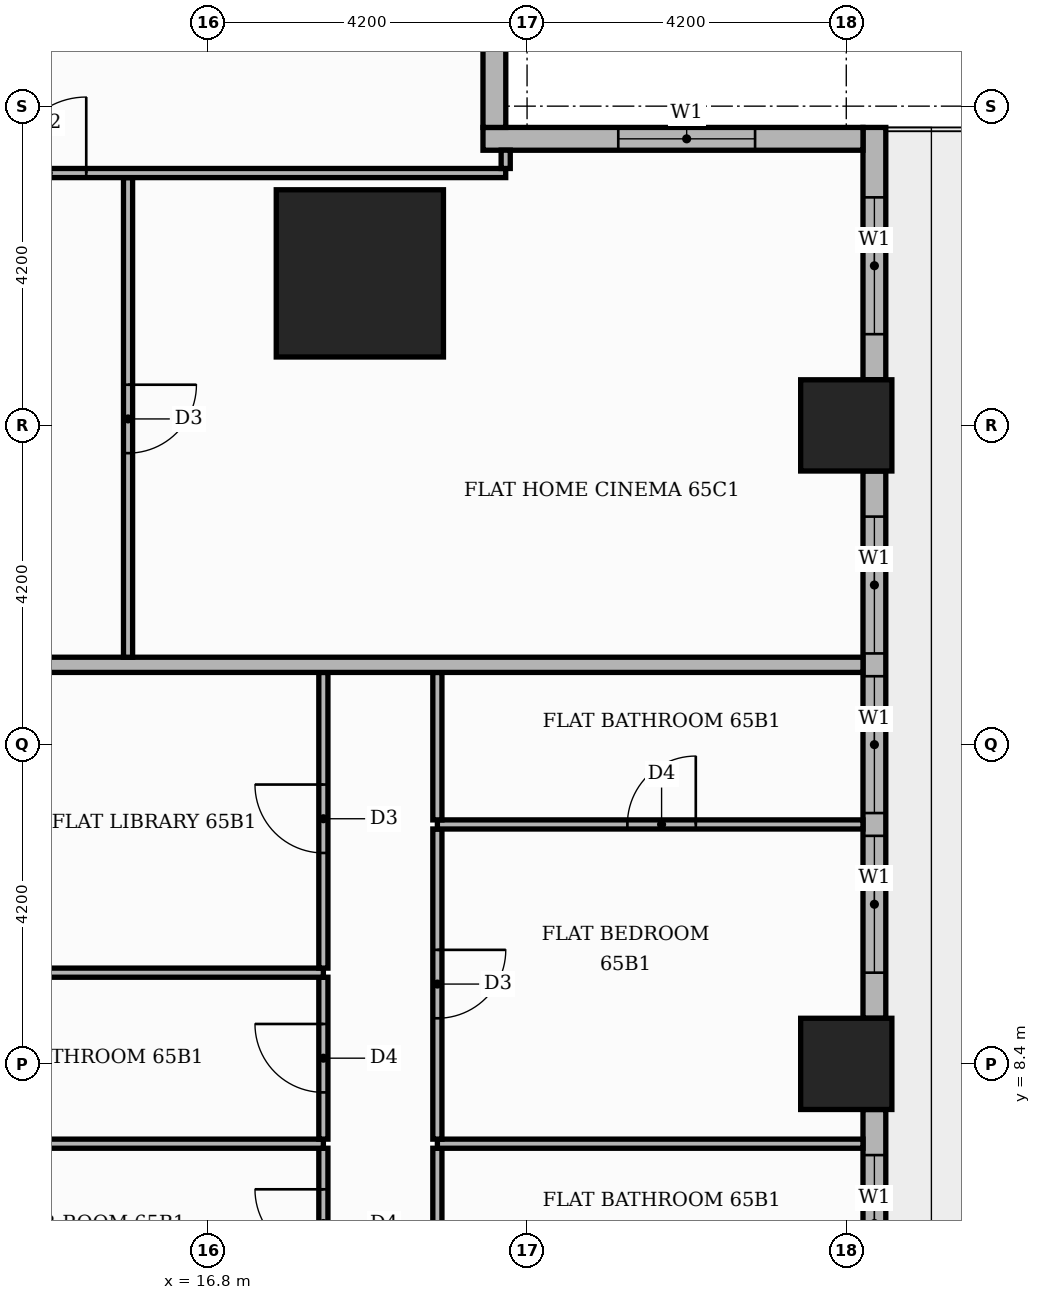
"""IFC4 building model, lengths in metres.
Left out: names, types, materials, properties, quantities, classifications, styles, units other than length and angle.
Written with IfcOpenShell. Run it as: python <this file> out.ifc"""

import sys

from ifc_helpers import new_model, si_unit, direction, frame, frame_2d, origin, origin_2d, place, context, subcontext, project, spatial, rectangle, extrude, element, fill, save


model = new_model("IFC4")
c1 = context("Model", 3, precision=1e-05, world=origin(), true_north=direction((0.0, 1.0)))
c2 = subcontext(c1, "Body", "Model", "MODEL_VIEW")
j1 = project(units=[si_unit("LENGTHUNIT", "METRE"), si_unit("PLANEANGLEUNIT", "RADIAN")], contexts=[c1])
p1 = place(None, origin())
s1 = spatial("IfcSite", under=j1, at=p1, CompositionType="ELEMENT")
p2 = place(p1, origin())
s2 = spatial("IfcBuilding", under=s1, at=p2, CompositionType="ELEMENT")
p3 = place(p2, frame((0.0, 0.0, 271.8)))
s3 = spatial("IfcBuildingStorey", under=s2, at=p3, CompositionType="ELEMENT", Elevation=271.8)
p4 = place(p3, frame((18.8, 18.8, 0.0), z_axis=(0.0, 0.0, 1.0), x_axis=(1.0, 0.0, 0.0)))
e1 = element("IfcColumn", 1, at=p4, inside=s3, PredefinedType="COLUMN", context=c2, shape_type="SweptSolid", body=[
    extrude(rectangle(XDim=2.2, YDim=2.2, at=origin_2d()), origin(), (0.0, 0.0, 1.0), 3.9),
])
for number, where, z_axis, x_axis in (
    (2, (25.2, 8.4, 0.0), (0.0, 0.0, 1.0), (1.0, 0.0, 0.0)),
    (3, (25.2, 16.8, 0.0), (0.0, 0.0, 1.0), (1.0, 0.0, 0.0)),
):
    element("IfcColumn", number, at=place(p3, frame(where, z_axis=z_axis, x_axis=x_axis)), inside=s3, PredefinedType="COLUMN", context=c2, shape_type="SweptSolid", body=[
        extrude(rectangle(XDim=1.2, YDim=1.2, at=origin_2d()), origin(), (0.0, 0.0, 1.0), 3.9),
    ])
p5 = place(p3, frame((25.57, 0.6, 0.0), z_axis=(0.0, 0.0, 1.0), x_axis=(0.0, 1.0, 0.0)))
e4 = element("IfcWall", 4, at=p5, inside=s3, PredefinedType="STANDARD", context=c2, shape_type="SweptSolid", body=[
    extrude(rectangle(XDim=7.2, YDim=0.3, at=frame_2d((3.6, 0.0))), origin(), (0.0, 0.0, 1.0), 3.48),
])
p6 = place(p5, frame((0.6, 0.0, 0.0)))
e5 = element("IfcOpeningElement", 5, at=p6, cuts=e4, PredefinedType="OPENING", context=c2, shape_type="SweptSolid", body=[
    extrude(rectangle(XDim=1.8, YDim=2.4, at=frame_2d((0.9, 1.2))), frame((0.0, 0.16, 0.0), z_axis=(0.0, -1.0, 0.0), x_axis=(1.0, 0.0, 0.0)), (0.0, 0.0, 1.0), 0.32),
])
p7 = place(p5, frame((2.7, 0.0, 0.9)))
e6 = element("IfcOpeningElement", 6, at=p7, cuts=e4, PredefinedType="OPENING", context=c2, shape_type="SweptSolid", body=[
    extrude(rectangle(XDim=1.8, YDim=2.1, at=frame_2d((0.9, 1.05))), frame((0.0, 0.16, 0.0), z_axis=(0.0, -1.0, 0.0), x_axis=(1.0, 0.0, 0.0)), (0.0, 0.0, 1.0), 0.32),
])
p8 = place(p5, frame((4.8, 0.0, 0.9)))
e7 = element("IfcOpeningElement", 7, at=p8, cuts=e4, PredefinedType="OPENING", context=c2, shape_type="SweptSolid", body=[
    extrude(rectangle(XDim=1.8, YDim=2.1, at=frame_2d((0.9, 1.05))), frame((0.0, 0.16, 0.0), z_axis=(0.0, -1.0, 0.0), x_axis=(1.0, 0.0, 0.0)), (0.0, 0.0, 1.0), 0.32),
])
p9 = place(p3, frame((25.57, 9.0, 0.0), z_axis=(0.0, 0.0, 1.0), x_axis=(0.0, 1.0, 0.0)))
e8 = element("IfcWall", 8, at=p9, inside=s3, PredefinedType="STANDARD", context=c2, shape_type="SweptSolid", body=[
    extrude(rectangle(XDim=7.2, YDim=0.3, at=frame_2d((3.6, 0.0))), origin(), (0.0, 0.0, 1.0), 3.48),
])
p10 = place(p9, frame((0.6, 0.0, 0.9)))
e9 = element("IfcOpeningElement", 9, at=p10, cuts=e8, PredefinedType="OPENING", context=c2, shape_type="SweptSolid", body=[
    extrude(rectangle(XDim=1.8, YDim=2.1, at=frame_2d((0.9, 1.05))), frame((0.0, 0.16, 0.0), z_axis=(0.0, -1.0, 0.0), x_axis=(1.0, 0.0, 0.0)), (0.0, 0.0, 1.0), 0.32),
])
p11 = place(p9, frame((2.7, 0.0, 0.9)))
e10 = element("IfcOpeningElement", 10, at=p11, cuts=e8, PredefinedType="OPENING", context=c2, shape_type="SweptSolid", body=[
    extrude(rectangle(XDim=1.8, YDim=2.1, at=frame_2d((0.9, 1.05))), frame((0.0, 0.16, 0.0), z_axis=(0.0, -1.0, 0.0), x_axis=(1.0, 0.0, 0.0)), (0.0, 0.0, 1.0), 0.32),
])
p12 = place(p9, frame((4.8, 0.0, 0.9)))
e11 = element("IfcOpeningElement", 11, at=p12, cuts=e8, PredefinedType="OPENING", context=c2, shape_type="SweptSolid", body=[
    extrude(rectangle(XDim=1.8, YDim=2.1, at=frame_2d((0.9, 1.05))), frame((0.0, 0.16, 0.0), z_axis=(0.0, -1.0, 0.0), x_axis=(1.0, 0.0, 0.0)), (0.0, 0.0, 1.0), 0.32),
])
p13 = place(p3, frame((25.57, 17.4, 0.0), z_axis=(0.0, 0.0, 1.0), x_axis=(0.0, 1.0, 0.0)))
e12 = element("IfcWall", 12, at=p13, inside=s3, PredefinedType="STANDARD", context=c2, shape_type="SweptSolid", body=[
    extrude(rectangle(XDim=3.32, YDim=0.3, at=frame_2d((1.66, 0.0))), origin(), (0.0, 0.0, 1.0), 3.48),
])
p14 = place(p13, frame((0.6, 0.0, 0.9)))
e13 = element("IfcOpeningElement", 13, at=p14, cuts=e12, PredefinedType="OPENING", context=c2, shape_type="SweptSolid", body=[
    extrude(rectangle(XDim=1.8, YDim=2.1, at=frame_2d((0.9, 1.05))), frame((0.0, 0.16, 0.0), z_axis=(0.0, -1.0, 0.0), x_axis=(1.0, 0.0, 0.0)), (0.0, 0.0, 1.0), 0.32),
])
p15 = place(p3, frame((25.42, 20.57, 0.0), z_axis=(0.0, 0.0, 1.0), x_axis=(-1.0, 0.0, 0.0)))
e14 = element("IfcWall", 14, at=p15, inside=s3, PredefinedType="STANDARD", context=c2, shape_type="SweptSolid", body=[
    extrude(rectangle(XDim=5.0, YDim=0.3, at=frame_2d((2.5, 0.0))), origin(), (0.0, 0.0, 1.0), 3.48),
])
p16 = place(p15, frame((1.42, 0.0, 0.9)))
e15 = element("IfcOpeningElement", 15, at=p16, cuts=e14, PredefinedType="OPENING", context=c2, shape_type="SweptSolid", body=[
    extrude(rectangle(XDim=1.8, YDim=2.1, at=frame_2d((0.9, 1.05))), frame((0.0, 0.16, 0.0), z_axis=(0.0, -1.0, 0.0), x_axis=(1.0, 0.0, 0.0)), (0.0, 0.0, 1.0), 0.32),
])
p17 = place(p3, frame((20.57, 20.72, 0.0), z_axis=(0.0, 0.0, 1.0), x_axis=(0.0, 1.0, 0.0)))
e16 = element("IfcWall", 16, at=p17, inside=s3, PredefinedType="STANDARD", context=c2, shape_type="SweptSolid", body=[
    extrude(rectangle(XDim=5.0, YDim=0.3, at=frame_2d((2.5, 0.0))), origin(), (0.0, 0.0, 1.0), 3.48),
])
p18 = place(p17, frame((1.48, 0.0, 0.9)))
e17 = element("IfcOpeningElement", 17, at=p18, cuts=e16, PredefinedType="OPENING", context=c2, shape_type="SweptSolid", body=[
    extrude(rectangle(XDim=1.8, YDim=2.1, at=frame_2d((0.9, 1.05))), frame((0.0, 0.16, 0.0), z_axis=(0.0, -1.0, 0.0), x_axis=(1.0, 0.0, 0.0)), (0.0, 0.0, 1.0), 0.32),
])
p19 = place(p3, frame((18.32, 5.31, 0.0), z_axis=(0.0, 0.0, 1.0), x_axis=(0.0, 1.0, 0.0)))
e18 = element("IfcWall", 18, at=p19, inside=s3, PredefinedType="PARTITIONING", context=c2, shape_type="SweptSolid", body=[
    extrude(rectangle(XDim=1.98, YDim=0.12, at=frame_2d((0.99, 0.0))), origin(), (0.0, 0.0, 1.0), 3.48),
])
p20 = place(p19, frame((0.54, 0.0, 0.0)))
e19 = element("IfcOpeningElement", 19, at=p20, cuts=e18, PredefinedType="OPENING", context=c2, shape_type="SweptSolid", body=[
    extrude(rectangle(XDim=0.9, YDim=2.1, at=frame_2d((0.45, 1.05))), frame((0.0, 0.07, 0.0), z_axis=(0.0, -1.0, 0.0), x_axis=(1.0, 0.0, 0.0)), (0.0, 0.0, 1.0), 0.14),
])
p21 = place(p3, frame((19.82, 5.31, 0.0), z_axis=(0.0, 0.0, 1.0), x_axis=(0.0, 1.0, 0.0)))
e20 = element("IfcWall", 20, at=p21, inside=s3, PredefinedType="PARTITIONING", context=c2, shape_type="SweptSolid", body=[
    extrude(rectangle(XDim=1.98, YDim=0.12, at=frame_2d((0.99, 0.0))), origin(), (0.0, 0.0, 1.0), 3.48),
])
p22 = place(p3, frame((11.0, 7.35, 0.0), z_axis=(0.0, 0.0, 1.0), x_axis=(1.0, 0.0, 0.0)))
e21 = element("IfcWall", 21, at=p22, inside=s3, PredefinedType="PARTITIONING", context=c2, shape_type="SweptSolid", body=[
    extrude(rectangle(XDim=7.32, YDim=0.12, at=frame_2d((3.66, 0.0))), origin(), (0.0, 0.0, 1.0), 3.48),
])
p23 = place(p3, frame((19.82, 7.35, 0.0), z_axis=(0.0, 0.0, 1.0), x_axis=(1.0, 0.0, 0.0)))
e22 = element("IfcWall", 22, at=p23, inside=s3, PredefinedType="PARTITIONING", context=c2, shape_type="SweptSolid", body=[
    extrude(rectangle(XDim=5.6, YDim=0.12, at=frame_2d((2.8, 0.0))), origin(), (0.0, 0.0, 1.0), 3.48),
])
p24 = place(p3, frame((18.32, 7.41, 0.0), z_axis=(0.0, 0.0, 1.0), x_axis=(0.0, 1.0, 0.0)))
e23 = element("IfcWall", 23, at=p24, inside=s3, PredefinedType="PARTITIONING", context=c2, shape_type="SweptSolid", body=[
    extrude(rectangle(XDim=2.13, YDim=0.12, at=frame_2d((1.065, 0.0))), origin(), (0.0, 0.0, 1.0), 3.48),
])
p25 = place(p24, frame((0.615, 0.0, 0.0)))
e24 = element("IfcOpeningElement", 24, at=p25, cuts=e23, PredefinedType="OPENING", context=c2, shape_type="SweptSolid", body=[
    extrude(rectangle(XDim=0.9, YDim=2.1, at=frame_2d((0.45, 1.05))), frame((0.0, 0.07, 0.0), z_axis=(0.0, -1.0, 0.0), x_axis=(1.0, 0.0, 0.0)), (0.0, 0.0, 1.0), 0.14),
])
p26 = place(p3, frame((19.82, 7.41, 0.0), z_axis=(0.0, 0.0, 1.0), x_axis=(0.0, 1.0, 0.0)))
e25 = element("IfcWall", 25, at=p26, inside=s3, PredefinedType="PARTITIONING", context=c2, shape_type="SweptSolid", body=[
    extrude(rectangle(XDim=4.08, YDim=0.12, at=frame_2d((2.04, 0.0))), origin(), (0.0, 0.0, 1.0), 3.48),
])
p27 = place(p26, frame((1.59, 0.0, 0.0)))
e26 = element("IfcOpeningElement", 26, at=p27, cuts=e25, PredefinedType="OPENING", context=c2, shape_type="SweptSolid", body=[
    extrude(rectangle(XDim=0.9, YDim=2.1, at=frame_2d((0.45, 1.05))), frame((0.0, 0.07, 0.0), z_axis=(0.0, -1.0, 0.0), x_axis=(1.0, 0.0, 0.0)), (0.0, 0.0, 1.0), 0.14),
])
p28 = place(p3, frame((11.0, 9.6, 0.0), z_axis=(0.0, 0.0, 1.0), x_axis=(1.0, 0.0, 0.0)))
e27 = element("IfcWall", 27, at=p28, inside=s3, PredefinedType="PARTITIONING", context=c2, shape_type="SweptSolid", body=[
    extrude(rectangle(XDim=7.32, YDim=0.12, at=frame_2d((3.66, 0.0))), origin(), (0.0, 0.0, 1.0), 3.48),
])
p29 = place(p3, frame((18.32, 9.66, 0.0), z_axis=(0.0, 0.0, 1.0), x_axis=(0.0, 1.0, 0.0)))
e28 = element("IfcWall", 28, at=p29, inside=s3, PredefinedType="PARTITIONING", context=c2, shape_type="SweptSolid", body=[
    extrude(rectangle(XDim=3.89, YDim=0.12, at=frame_2d((1.945, 0.0))), origin(), (0.0, 0.0, 1.0), 3.48),
])
p30 = place(p29, frame((1.515, 0.0, 0.0)))
e29 = element("IfcOpeningElement", 29, at=p30, cuts=e28, PredefinedType="OPENING", context=c2, shape_type="SweptSolid", body=[
    extrude(rectangle(XDim=0.9, YDim=2.1, at=frame_2d((0.45, 1.05))), frame((0.0, 0.07, 0.0), z_axis=(0.0, -1.0, 0.0), x_axis=(1.0, 0.0, 0.0)), (0.0, 0.0, 1.0), 0.14),
])
p31 = place(p3, frame((19.82, 11.55, 0.0), z_axis=(0.0, 0.0, 1.0), x_axis=(1.0, 0.0, 0.0)))
e30 = element("IfcWall", 30, at=p31, inside=s3, PredefinedType="PARTITIONING", context=c2, shape_type="SweptSolid", body=[
    extrude(rectangle(XDim=5.6, YDim=0.12, at=frame_2d((2.8, 0.0))), origin(), (0.0, 0.0, 1.0), 3.48),
])
p32 = place(p31, frame((2.5, 0.0, 0.0)))
e31 = element("IfcOpeningElement", 31, at=p32, cuts=e30, PredefinedType="OPENING", context=c2, shape_type="SweptSolid", body=[
    extrude(rectangle(XDim=0.9, YDim=2.1, at=frame_2d((0.45, 1.05))), frame((0.0, 0.07, 0.0), z_axis=(0.0, -1.0, 0.0), x_axis=(1.0, 0.0, 0.0)), (0.0, 0.0, 1.0), 0.14),
])
p33 = place(p3, frame((19.82, 11.61, 0.0), z_axis=(0.0, 0.0, 1.0), x_axis=(0.0, 1.0, 0.0)))
e32 = element("IfcWall", 32, at=p33, inside=s3, PredefinedType="PARTITIONING", context=c2, shape_type="SweptSolid", body=[
    extrude(rectangle(XDim=1.94, YDim=0.12, at=frame_2d((0.97, 0.0))), origin(), (0.0, 0.0, 1.0), 3.48),
])
p34 = place(p3, frame((-13.65, 13.65, 0.0), z_axis=(0.0, 0.0, 1.0), x_axis=(1.0, 0.0, 0.0)))
e33 = element("IfcWall", 33, at=p34, inside=s3, PredefinedType="PARTITIONING", context=c2, shape_type="SweptSolid", body=[
    extrude(rectangle(XDim=39.07, YDim=0.2, at=frame_2d((19.535, 0.0))), origin(), (0.0, 0.0, 1.0), 3.48),
])
p35 = place(p34, frame((24.65, 0.0, 0.0)))
e34 = element("IfcOpeningElement", 34, at=p35, cuts=e33, PredefinedType="OPENING", context=c2, shape_type="SweptSolid", body=[
    extrude(rectangle(XDim=1.1, YDim=2.4, at=frame_2d((0.55, 1.2))), frame((0.0, 0.11, 0.0), z_axis=(0.0, -1.0, 0.0), x_axis=(1.0, 0.0, 0.0)), (0.0, 0.0, 1.0), 0.22),
])
p36 = place(p3, frame((15.75, 13.75, 0.0), z_axis=(0.0, 0.0, 1.0), x_axis=(0.0, 1.0, 0.0)))
e35 = element("IfcWall", 35, at=p36, inside=s3, PredefinedType="PARTITIONING", context=c2, shape_type="SweptSolid", body=[
    extrude(rectangle(XDim=6.31, YDim=0.12, at=frame_2d((3.155, 0.0))), origin(), (0.0, 0.0, 1.0), 3.48),
])
p37 = place(p36, frame((2.685, 0.0, 0.0)))
e36 = element("IfcOpeningElement", 36, at=p37, cuts=e35, PredefinedType="OPENING", context=c2, shape_type="SweptSolid", body=[
    extrude(rectangle(XDim=0.9, YDim=2.1, at=frame_2d((0.45, 1.05))), frame((0.0, 0.07, 0.0), z_axis=(0.0, -1.0, 0.0), x_axis=(1.0, 0.0, 0.0)), (0.0, 0.0, 1.0), 0.14),
])
p38 = place(p3, frame((-13.55, 20.12, 0.0), z_axis=(0.0, 0.0, 1.0), x_axis=(1.0, 0.0, 0.0)))
e37 = element("IfcWall", 37, at=p38, inside=s3, PredefinedType="PARTITIONING", context=c2, shape_type="SweptSolid", body=[
    extrude(rectangle(XDim=34.269, YDim=0.12, at=frame_2d((17.135, 0.0))), origin(), (0.0, 0.0, 1.0), 3.48),
])
p39 = place(p38, frame((27.75, 0.0, 0.0)))
e38 = element("IfcOpeningElement", 38, at=p39, cuts=e37, PredefinedType="OPENING", context=c2, shape_type="SweptSolid", body=[
    extrude(rectangle(XDim=1.0, YDim=2.1, at=frame_2d((0.5, 1.05))), frame((0.0, 0.07, 0.0), z_axis=(0.0, -1.0, 0.0), x_axis=(1.0, 0.0, 0.0)), (0.0, 0.0, 1.0), 0.14),
])
p40 = place(p38, frame((22.5, 0.0, 0.0)))
e39 = element("IfcOpeningElement", 39, at=p40, cuts=e37, PredefinedType="OPENING", context=c2, shape_type="SweptSolid", body=[
    extrude(rectangle(XDim=1.0, YDim=2.1, at=frame_2d((0.5, 1.05))), frame((0.0, 0.07, 0.0), z_axis=(0.0, -1.0, 0.0), x_axis=(1.0, 0.0, 0.0)), (0.0, 0.0, 1.0), 0.14),
])
p41 = place(p38, frame((14.15, 0.0, 0.0)))
e40 = element("IfcOpeningElement", 40, at=p41, cuts=e37, PredefinedType="OPENING", context=c2, shape_type="SweptSolid", body=[
    extrude(rectangle(XDim=0.9, YDim=2.1, at=frame_2d((0.45, 1.05))), frame((0.0, 0.07, 0.0), z_axis=(0.0, -1.0, 0.0), x_axis=(1.0, 0.0, 0.0)), (0.0, 0.0, 1.0), 0.14),
])
p42 = place(p38, frame((3.65, 0.0, 0.0)))
e41 = element("IfcOpeningElement", 41, at=p42, cuts=e37, PredefinedType="OPENING", context=c2, shape_type="SweptSolid", body=[
    extrude(rectangle(XDim=0.9, YDim=2.1, at=frame_2d((0.45, 1.05))), frame((0.0, 0.07, 0.0), z_axis=(0.0, -1.0, 0.0), x_axis=(1.0, 0.0, 0.0)), (0.0, 0.0, 1.0), 0.14),
])
p43 = place(p3, frame((20.719, 20.18, 0.0), z_axis=(0.0, 0.0, 1.0), x_axis=(0.0, 1.0, 0.0)))
e42 = element("IfcWall", 42, at=p43, inside=s3, PredefinedType="PARTITIONING", context=c2, shape_type="SweptSolid", body=[
    extrude(rectangle(XDim=0.241, YDim=0.12, at=frame_2d((0.121, 0.0))), origin(), (0.0, 0.0, 1.0), 3.48),
])
p44 = place(p8, origin())
e43 = element("IfcWindow", 43, at=p44, inside=s3, PartitioningType="SINGLE_PANEL", PredefinedType="WINDOW", context=c2, shape_type="SweptSolid", body=[
    extrude(rectangle(XDim=1.8, YDim=2.1, at=frame_2d((0.9, 1.05))), frame((0.0, 0.03, 0.0), z_axis=(0.0, -1.0, 0.0), x_axis=(1.0, 0.0, 0.0)), (0.0, 0.0, 1.0), 0.06),
])
fill(e7, e43)
p45 = place(p10, origin())
e44 = element("IfcWindow", 44, at=p45, inside=s3, PartitioningType="SINGLE_PANEL", PredefinedType="WINDOW", context=c2, shape_type="SweptSolid", body=[
    extrude(rectangle(XDim=1.8, YDim=2.1, at=frame_2d((0.9, 1.05))), frame((0.0, 0.03, 0.0), z_axis=(0.0, -1.0, 0.0), x_axis=(1.0, 0.0, 0.0)), (0.0, 0.0, 1.0), 0.06),
])
fill(e9, e44)
p46 = place(p11, origin())
e45 = element("IfcWindow", 45, at=p46, inside=s3, PartitioningType="SINGLE_PANEL", PredefinedType="WINDOW", context=c2, shape_type="SweptSolid", body=[
    extrude(rectangle(XDim=1.8, YDim=2.1, at=frame_2d((0.9, 1.05))), frame((0.0, 0.03, 0.0), z_axis=(0.0, -1.0, 0.0), x_axis=(1.0, 0.0, 0.0)), (0.0, 0.0, 1.0), 0.06),
])
fill(e10, e45)
p47 = place(p12, origin())
e46 = element("IfcWindow", 46, at=p47, inside=s3, PartitioningType="SINGLE_PANEL", PredefinedType="WINDOW", context=c2, shape_type="SweptSolid", body=[
    extrude(rectangle(XDim=1.8, YDim=2.1, at=frame_2d((0.9, 1.05))), frame((0.0, 0.03, 0.0), z_axis=(0.0, -1.0, 0.0), x_axis=(1.0, 0.0, 0.0)), (0.0, 0.0, 1.0), 0.06),
])
fill(e11, e46)
p48 = place(p14, origin())
e47 = element("IfcWindow", 47, at=p48, inside=s3, PartitioningType="SINGLE_PANEL", PredefinedType="WINDOW", context=c2, shape_type="SweptSolid", body=[
    extrude(rectangle(XDim=1.8, YDim=2.1, at=frame_2d((0.9, 1.05))), frame((0.0, 0.03, 0.0), z_axis=(0.0, -1.0, 0.0), x_axis=(1.0, 0.0, 0.0)), (0.0, 0.0, 1.0), 0.06),
])
fill(e13, e47)
p49 = place(p16, origin())
e48 = element("IfcWindow", 48, at=p49, inside=s3, PartitioningType="SINGLE_PANEL", PredefinedType="WINDOW", context=c2, shape_type="SweptSolid", body=[
    extrude(rectangle(XDim=1.8, YDim=2.1, at=frame_2d((0.9, 1.05))), frame((0.0, 0.03, 0.0), z_axis=(0.0, -1.0, 0.0), x_axis=(1.0, 0.0, 0.0)), (0.0, 0.0, 1.0), 0.06),
])
fill(e15, e48)
p50 = place(p20, origin())
e49 = element("IfcDoor", 49, at=p50, inside=s3, OperationType="SINGLE_SWING_RIGHT", PredefinedType="DOOR", context=c2, shape_type="SweptSolid", body=[
    extrude(rectangle(XDim=0.9, YDim=2.1, at=frame_2d((0.45, 1.05))), frame((0.0, 0.025, 0.0), z_axis=(0.0, -1.0, 0.0), x_axis=(1.0, 0.0, 0.0)), (0.0, 0.0, 1.0), 0.05),
])
fill(e19, e49)
p51 = place(p25, origin())
e50 = element("IfcDoor", 50, at=p51, inside=s3, OperationType="SINGLE_SWING_RIGHT", PredefinedType="DOOR", context=c2, shape_type="SweptSolid", body=[
    extrude(rectangle(XDim=0.9, YDim=2.1, at=frame_2d((0.45, 1.05))), frame((0.0, 0.025, 0.0), z_axis=(0.0, -1.0, 0.0), x_axis=(1.0, 0.0, 0.0)), (0.0, 0.0, 1.0), 0.05),
])
fill(e24, e50)
p52 = place(p30, origin())
e51 = element("IfcDoor", 51, at=p52, inside=s3, OperationType="SINGLE_SWING_RIGHT", PredefinedType="DOOR", context=c2, shape_type="SweptSolid", body=[
    extrude(rectangle(XDim=0.9, YDim=2.1, at=frame_2d((0.45, 1.05))), frame((0.0, 0.025, 0.0), z_axis=(0.0, -1.0, 0.0), x_axis=(1.0, 0.0, 0.0)), (0.0, 0.0, 1.0), 0.05),
])
fill(e29, e51)
p53 = place(p27, frame((0.9, 0.0, 0.0), z_axis=(0.0, 0.0, 1.0), x_axis=(-1.0, 0.0, 0.0)))
e52 = element("IfcDoor", 52, at=p53, inside=s3, OperationType="SINGLE_SWING_RIGHT", PredefinedType="DOOR", context=c2, shape_type="SweptSolid", body=[
    extrude(rectangle(XDim=0.9, YDim=2.1, at=frame_2d((0.45, 1.05))), frame((0.0, 0.025, 0.0), z_axis=(0.0, -1.0, 0.0), x_axis=(1.0, 0.0, 0.0)), (0.0, 0.0, 1.0), 0.05),
])
fill(e26, e52)
p54 = place(p32, origin())
e53 = element("IfcDoor", 53, at=p54, inside=s3, OperationType="SINGLE_SWING_RIGHT", PredefinedType="DOOR", context=c2, shape_type="SweptSolid", body=[
    extrude(rectangle(XDim=0.9, YDim=2.1, at=frame_2d((0.45, 1.05))), frame((0.0, 0.025, 0.0), z_axis=(0.0, -1.0, 0.0), x_axis=(1.0, 0.0, 0.0)), (0.0, 0.0, 1.0), 0.05),
])
fill(e31, e53)
p55 = place(p37, frame((0.9, 0.0, 0.0), z_axis=(0.0, 0.0, 1.0), x_axis=(-1.0, 0.0, 0.0)))
e54 = element("IfcDoor", 54, at=p55, inside=s3, OperationType="SINGLE_SWING_RIGHT", PredefinedType="DOOR", context=c2, shape_type="SweptSolid", body=[
    extrude(rectangle(XDim=0.9, YDim=2.1, at=frame_2d((0.45, 1.05))), frame((0.0, 0.025, 0.0), z_axis=(0.0, -1.0, 0.0), x_axis=(1.0, 0.0, 0.0)), (0.0, 0.0, 1.0), 0.05),
])
fill(e36, e54)
p56 = place(p39, origin())
e55 = element("IfcDoor", 55, at=p56, inside=s3, OperationType="SINGLE_SWING_RIGHT", PredefinedType="DOOR", context=c2, shape_type="SweptSolid", body=[
    extrude(rectangle(XDim=1.0, YDim=2.1, at=frame_2d((0.5, 1.05))), frame((0.0, 0.025, 0.0), z_axis=(0.0, -1.0, 0.0), x_axis=(1.0, 0.0, 0.0)), (0.0, 0.0, 1.0), 0.05),
])
fill(e38, e55)
save(model, sys.argv[1])
